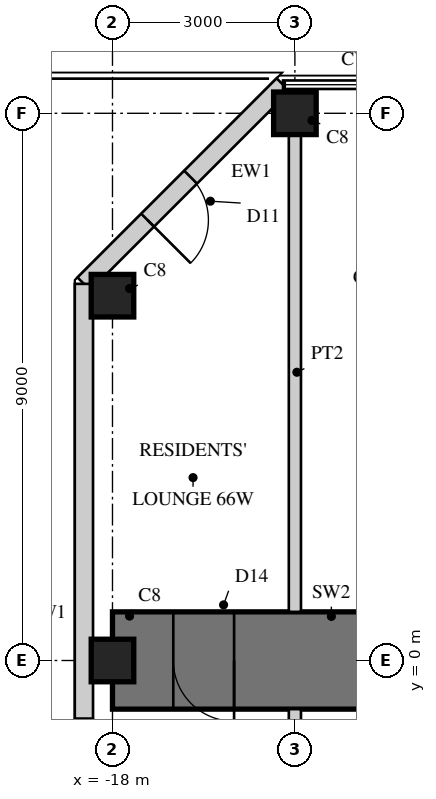
"""IFC4 building model, lengths in metres.
Left out: names, types, materials, properties, quantities, classifications, styles, units other than length and angle.
Written with IfcOpenShell. Run it as: python <this file> out.ifc"""

import sys

from ifc_helpers import new_model, si_unit, direction, frame, frame_2d, origin, origin_2d, place, context, subcontext, project, spatial, rectangle, hollow_rectangle, extrude, element, fill, save


model = new_model("IFC4")
c1 = context("Model", 3, precision=1e-05, world=origin(), true_north=direction((0.0, 1.0)))
c2 = subcontext(c1, "Body", "Model", "MODEL_VIEW")
j1 = project(units=[si_unit("LENGTHUNIT", "METRE"), si_unit("PLANEANGLEUNIT", "RADIAN")], contexts=[c1])
p1 = place(None, origin())
s1 = spatial("IfcSite", under=j1, at=p1, CompositionType="ELEMENT")
p2 = place(p1, origin())
s2 = spatial("IfcBuilding", under=s1, at=p2, CompositionType="ELEMENT")
p3 = place(p2, frame((0.0, 0.0, 257.7)))
s3 = spatial("IfcBuildingStorey", under=s2, at=p3, CompositionType="ELEMENT", Elevation=257.7)
p4 = place(p3, frame((-9.0, 0.0, 0.0), z_axis=(0.0, 0.0, 1.0), x_axis=(-1.0, 0.0, 0.0)))
e1 = element("IfcWall", 1, at=p4, inside=s3, PredefinedType="SHEAR", context=c2, shape_type="SweptSolid", body=[
    extrude(rectangle(XDim=9.0, YDim=1.6, at=frame_2d((4.5, 0.0))), origin(), (0.0, 0.0, 1.0), 3.4),
])
p5 = place(p4, frame((3.8, 0.0, 0.0)))
e2 = element("IfcOpeningElement", 2, at=p5, cuts=e1, PredefinedType="OPENING", context=c2, shape_type="SweptSolid", body=[
    extrude(rectangle(XDim=1.0, YDim=2.15, at=frame_2d((0.5, 1.075))), frame((0.0, 0.81, 0.0), z_axis=(0.0, -1.0, 0.0), x_axis=(1.0, 0.0, 0.0)), (0.0, 0.0, 1.0), 1.62),
])
p6 = place(p4, frame((7.0, 0.0, 0.0)))
e3 = element("IfcOpeningElement", 3, at=p6, cuts=e1, PredefinedType="OPENING", context=c2, shape_type="SweptSolid", body=[
    extrude(rectangle(XDim=1.0, YDim=2.2, at=frame_2d((0.5, 1.1))), frame((0.0, 0.81, 0.0), z_axis=(0.0, -1.0, 0.0), x_axis=(1.0, 0.0, 0.0)), (0.0, 0.0, 1.0), 1.62),
])
for number, where, z_axis, x_axis in (
    (4, (-15.0, 9.0, 0.0), (0.0, 0.0, 1.0), (1.0, 0.0, 0.0)),
    (5, (-18.0, 6.0, 0.0), (0.0, 0.0, 1.0), (1.0, 0.0, 0.0)),
    (6, (-18.0, 0.0, 0.0), (0.0, 0.0, 1.0), (1.0, 0.0, 0.0)),
):
    element("IfcColumn", number, at=place(p3, frame(where, z_axis=z_axis, x_axis=x_axis)), inside=s3, PredefinedType="COLUMN", context=c2, shape_type="SweptSolid", body=[
        extrude(rectangle(XDim=0.7, YDim=0.7, at=origin_2d()), origin(), (0.0, 0.0, 1.0), 3.4),
    ])
p7 = place(p3, frame((-15.195, 9.47, 0.0), z_axis=(0.0, 0.0, 1.0), x_axis=(-0.707106781187, -0.707106781187, 0.0)))
e7 = element("IfcWall", 7, at=p7, inside=s3, PredefinedType="SOLIDWALL", context=c2, shape_type="SweptSolid", body=[
    extrude(rectangle(XDim=4.632, YDim=0.3, at=frame_2d((2.316, 0.0))), origin(), (0.0, 0.0, 1.0), 3.22),
])
p8 = place(p7, frame((2.15, 0.0, 0.0)))
e8 = element("IfcOpeningElement", 8, at=p8, cuts=e7, PredefinedType="OPENING", context=c2, shape_type="SweptSolid", body=[
    extrude(rectangle(XDim=1.0, YDim=2.4, at=frame_2d((0.5, 1.2))), frame((0.0, 0.16, 0.0), z_axis=(0.0, -1.0, 0.0), x_axis=(1.0, 0.0, 0.0)), (0.0, 0.0, 1.0), 0.32),
])
p9 = place(p3, frame((-18.47, 6.195, 0.0), z_axis=(0.0, 0.0, 1.0), x_axis=(0.0, -1.0, 0.0)))
e9 = element("IfcWall", 9, at=p9, inside=s3, PredefinedType="SOLIDWALL", context=c2, shape_type="SweptSolid", body=[
    extrude(rectangle(XDim=12.389, YDim=0.3, at=frame_2d((6.195, 0.0))), origin(), (0.0, 0.0, 1.0), 3.22),
])
p10 = place(p9, frame((7.15, 0.0, 0.0)))
e10 = element("IfcOpeningElement", 10, at=p10, cuts=e9, PredefinedType="OPENING", context=c2, shape_type="SweptSolid", body=[
    extrude(rectangle(XDim=1.0, YDim=2.4, at=frame_2d((0.5, 1.2))), frame((0.0, 0.16, 0.0), z_axis=(0.0, -1.0, 0.0), x_axis=(1.0, 0.0, 0.0)), (0.0, 0.0, 1.0), 0.32),
])
p11 = place(p3, frame((-15.0, 8.65, 0.0), z_axis=(0.0, 0.0, 1.0), x_axis=(0.0, -1.0, 0.0)))
e11 = element("IfcWall", 11, at=p11, inside=s3, PredefinedType="SOLIDWALL", context=c2, shape_type="SweptSolid", body=[
    extrude(rectangle(XDim=7.85, YDim=0.2, at=frame_2d((3.925, 0.0))), origin(), (0.0, 0.0, 1.0), 2.52),
])
p12 = place(p3, frame((-15.0, -0.8, 0.0), z_axis=(0.0, 0.0, 1.0), x_axis=(0.0, -1.0, 0.0)))
e12 = element("IfcWall", 12, at=p12, inside=s3, PredefinedType="SOLIDWALL", context=c2, shape_type="SweptSolid", body=[
    extrude(rectangle(XDim=7.85, YDim=0.2, at=frame_2d((3.925, 0.0))), origin(), (0.0, 0.0, 1.0), 2.52),
])
p13 = place(p12, frame((0.35, 0.0, 0.0)))
e13 = element("IfcOpeningElement", 13, at=p13, cuts=e12, PredefinedType="OPENING", context=c2, shape_type="SweptSolid", body=[
    extrude(rectangle(XDim=1.0, YDim=2.2, at=frame_2d((0.5, 1.1))), frame((0.0, 0.11, 0.0), z_axis=(0.0, -1.0, 0.0), x_axis=(1.0, 0.0, 0.0)), (0.0, 0.0, 1.0), 0.22),
])
p14 = place(p8, origin())
e14 = element("IfcDoor", 14, at=p14, inside=s3, OperationType="SINGLE_SWING_RIGHT", PredefinedType="DOOR", context=c2, shape_type="SweptSolid", body=[
    extrude(hollow_rectangle(XDim=1.0, YDim=2.4, WallThickness=0.06, at=frame_2d((0.5, 1.2))), frame((0.0, 0.025, 0.0), z_axis=(0.0, -1.0, 0.0), x_axis=(1.0, 0.0, 0.0)), (0.0, 0.0, 1.0), 0.05),
    extrude(rectangle(XDim=0.879, YDim=2.279, at=frame_2d((0.5, 1.2))), frame((0.0, 0.025, 0.0), z_axis=(0.0, -1.0, 0.0), x_axis=(1.0, 0.0, 0.0)), (0.0, 0.0, 1.0), 0.05),
])
fill(e8, e14)
p15 = place(p10, origin())
e15 = element("IfcDoor", 15, at=p15, inside=s3, OperationType="SINGLE_SWING_RIGHT", PredefinedType="DOOR", context=c2, shape_type="SweptSolid", body=[
    extrude(hollow_rectangle(XDim=1.0, YDim=2.4, WallThickness=0.06, at=frame_2d((0.5, 1.2))), frame((0.0, 0.025, 0.0), z_axis=(0.0, -1.0, 0.0), x_axis=(1.0, 0.0, 0.0)), (0.0, 0.0, 1.0), 0.05),
    extrude(rectangle(XDim=0.879, YDim=2.279, at=frame_2d((0.5, 1.2))), frame((0.0, 0.025, 0.0), z_axis=(0.0, -1.0, 0.0), x_axis=(1.0, 0.0, 0.0)), (0.0, 0.0, 1.0), 0.05),
])
fill(e10, e15)
p16 = place(p6, origin())
e16 = element("IfcDoor", 16, at=p16, inside=s3, OperationType="SINGLE_SWING_LEFT", PredefinedType="DOOR", context=c2, shape_type="SweptSolid", body=[
    extrude(rectangle(XDim=1.0, YDim=2.2, at=frame_2d((0.5, 1.1))), frame((0.0, 0.025, 0.0), z_axis=(0.0, -1.0, 0.0), x_axis=(1.0, 0.0, 0.0)), (0.0, 0.0, 1.0), 0.05),
])
fill(e3, e16)
save(model, sys.argv[1])
